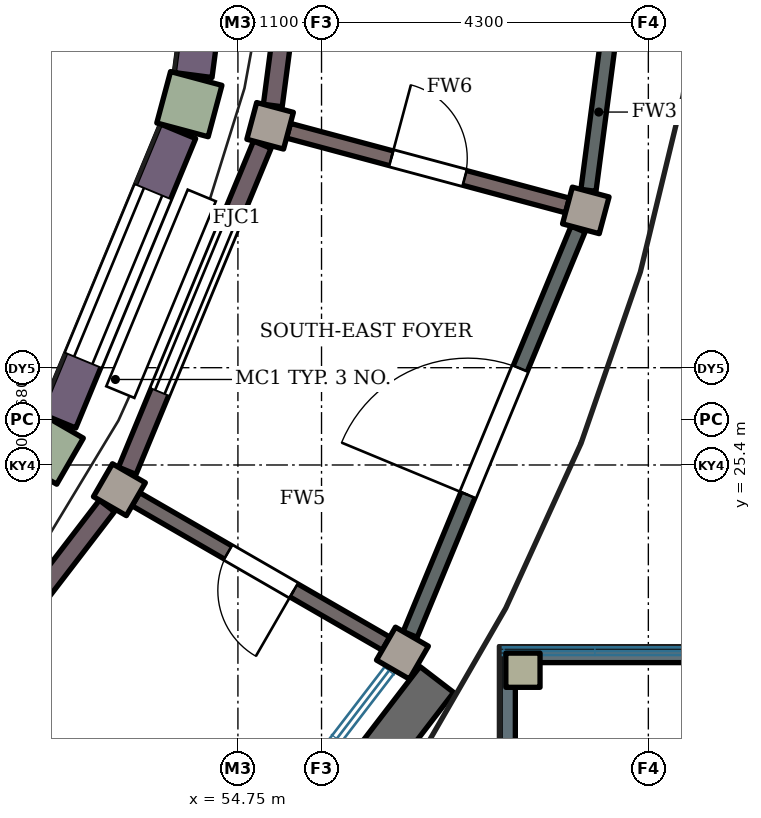
"""IFC4 building model, lengths in metres.
Left out: names, types, materials, properties, quantities, classifications, styles, units other than length and angle.
Written with IfcOpenShell. Run it as: python <this file> out.ifc"""

import sys

from ifc_helpers import new_model, si_unit, direction, frame, frame_2d, origin, origin_2d, place, context, subcontext, project, spatial, rectangle, extrude, element, fill, save


model = new_model("IFC4")
c1 = context("Model", 3, precision=1e-05, world=origin(), true_north=direction((0.0, 1.0)))
c2 = subcontext(c1, "Body", "Model", "MODEL_VIEW")
j1 = project(units=[si_unit("LENGTHUNIT", "METRE"), si_unit("PLANEANGLEUNIT", "RADIAN")], contexts=[c1])
p1 = place(None, origin())
s1 = spatial("IfcSite", under=j1, at=p1, CompositionType="ELEMENT")
p2 = place(p1, origin())
s2 = spatial("IfcBuilding", under=s1, at=p2, CompositionType="ELEMENT")
p3 = place(p2, origin())
s3 = spatial("IfcBuildingStorey", under=s2, at=p3, CompositionType="ELEMENT", Elevation=0.0)
for number, where, z_axis, x_axis in (
    (1, (52.238, 25.625, 0.0), (0.0, 0.0, 1.0), (0.5, 0.866, 0.0)),
    (2, (54.111, 30.147, 0.0), (0.0, 0.0, 1.0), (0.259, 0.966, 0.0)),
):
    element("IfcColumn", number, at=place(p3, frame(where, z_axis=z_axis, x_axis=x_axis)), inside=s3, PredefinedType="COLUMN", context=c2, shape_type="SweptSolid", body=[
        extrude(rectangle(XDim=0.7, YDim=0.7, at=origin_2d()), origin(), (0.0, 0.0, 1.0), 4.2),
    ])
p4 = place(p3, frame((52.386, 25.982, 0.0), z_axis=(0.0, 0.0, 1.0), x_axis=(0.382688328955, 0.923877504262, 0.0)))
e3 = element("IfcWall", 3, at=p4, inside=s3, PredefinedType="SHEAR", context=c2, shape_type="SweptSolid", body=[
    extrude(rectangle(XDim=4.122, YDim=0.5, at=frame_2d((2.061, 0.0))), origin(), (0.0, 0.0, 1.0), 3.4),
])
p5 = place(p4, frame((0.861, 0.0, 0.0)))
e4 = element("IfcOpeningElement", 4, at=p5, cuts=e3, PredefinedType="OPENING", context=c2, shape_type="SweptSolid", body=[
    extrude(rectangle(XDim=2.4, YDim=3.2, at=frame_2d((1.2, 1.6))), frame((0.0, 0.26, 0.0), z_axis=(0.0, -1.0, 0.0), x_axis=(1.0, 0.0, 0.0)), (0.0, 0.0, 1.0), 0.52),
])
p6 = place(p3, frame((54.162, 30.53, 0.0), z_axis=(0.0, 0.0, 1.0), x_axis=(0.130483623501, 0.991450464722, 0.0)))
e5 = element("IfcWall", 5, at=p6, inside=s3, PredefinedType="SHEAR", context=c2, shape_type="SweptSolid", body=[
    extrude(rectangle(XDim=4.122, YDim=0.5, at=frame_2d((2.061, 0.0))), origin(), (0.0, 0.0, 1.0), 3.4),
])
for number, where, z_axis, x_axis in (
    (6, (53.191, 25.075, 0.0), (0.0, 0.0, 1.0), (0.5, 0.866, 0.0)),
    (7, (55.174, 29.863, 0.0), (0.0, 0.0, 1.0), (0.259, 0.966, 0.0)),
    (8, (56.915, 22.925, 0.0), (0.0, 0.0, 1.0), (0.5, 0.866, 0.0)),
    (9, (59.327, 28.75, 0.0), (0.0, 0.0, 1.0), (0.259, 0.966, 0.0)),
):
    element("IfcColumn", number, at=place(p3, frame(where, z_axis=z_axis, x_axis=x_axis)), inside=s3, PredefinedType="COLUMN", context=c2, shape_type="SweptSolid", body=[
        extrude(rectangle(XDim=0.5, YDim=0.5, at=origin_2d()), origin(), (0.0, 0.0, 1.0), 4.2),
    ])
p7 = place(p3, frame((50.2, 21.177, 0.0), z_axis=(0.0, 0.0, 1.0), x_axis=(0.608762612058, 0.793352432504, 0.0)))
e10 = element("IfcWall", 10, at=p7, inside=s3, PredefinedType="SHEAR", context=c2, shape_type="SweptSolid", body=[
    extrude(rectangle(XDim=4.644, YDim=0.25, at=frame_2d((2.322, 0.0))), origin(), (0.0, 0.0, 1.0), 3.6),
])
p8 = place(p3, frame((53.294, 25.324, 0.0), z_axis=(0.0, 0.0, 1.0), x_axis=(0.382658268537, 0.923889955309, 0.0)))
e11 = element("IfcWall", 11, at=p8, inside=s3, PredefinedType="SHEAR", context=c2, shape_type="SweptSolid", body=[
    extrude(rectangle(XDim=4.644, YDim=0.25, at=frame_2d((2.322, 0.0))), origin(), (0.0, 0.0, 1.0), 3.6),
])
p9 = place(p8, frame((1.122, 0.0, 0.0)))
e12 = element("IfcOpeningElement", 12, at=p9, cuts=e11, PredefinedType="OPENING", context=c2, shape_type="SweptSolid", body=[
    extrude(rectangle(XDim=2.4, YDim=2.6, at=frame_2d((1.2, 1.3))), frame((0.0, 0.135, 0.0), z_axis=(0.0, -1.0, 0.0), x_axis=(1.0, 0.0, 0.0)), (0.0, 0.0, 1.0), 0.27),
])
p10 = place(p3, frame((55.209, 30.129, 0.0), z_axis=(0.0, 0.0, 1.0), x_axis=(0.130541551055, 0.991442839224, 0.0)))
e13 = element("IfcWall", 13, at=p10, inside=s3, PredefinedType="SHEAR", context=c2, shape_type="SweptSolid", body=[
    extrude(rectangle(XDim=4.644, YDim=0.25, at=frame_2d((2.322, 0.0))), origin(), (0.0, 0.0, 1.0), 3.6),
])
p11 = place(p3, frame((58.5, 22.7, 0.0), z_axis=(0.0, 0.0, 1.0), x_axis=(1.0, 0.0, 0.0)))
e14 = element("IfcColumn", 14, at=p11, inside=s3, PredefinedType="COLUMN", context=c2, shape_type="SweptSolid", body=[
    extrude(rectangle(XDim=0.45, YDim=0.45, at=origin_2d()), origin(), (0.0, 0.0, 1.0), 3.78),
])
p12 = place(p3, frame((58.3, 20.0, 4.0), z_axis=(0.0, 0.0, 1.0), x_axis=(0.0, 1.0, 0.0)))
e15 = element("IfcWall", 15, at=p12, inside=s3, PredefinedType="PARAPET", context=c2, shape_type="SweptSolid", body=[
    extrude(rectangle(XDim=3.0, YDim=0.2, at=frame_2d((1.5, 0.0))), origin(), (0.0, 0.0, 1.0), 0.45),
])
p13 = place(p3, frame((58.4, 22.9, 4.0), z_axis=(0.0, 0.0, 1.0), x_axis=(1.0, 0.0, 0.0)))
e16 = element("IfcWall", 16, at=p13, inside=s3, PredefinedType="PARAPET", context=c2, shape_type="SweptSolid", body=[
    extrude(rectangle(XDim=7.0, YDim=0.2, at=frame_2d((3.5, 0.0))), origin(), (0.0, 0.0, 1.0), 0.45),
])
p14 = place(p3, frame((57.016, 23.171, 0.0), z_axis=(0.0, 0.0, 1.0), x_axis=(0.382665553446, 0.923886938, 0.0)))
e17 = element("IfcWall", 17, at=p14, inside=s3, PredefinedType="STANDARD", context=c2, shape_type="SweptSolid", body=[
    extrude(rectangle(XDim=5.773, YDim=0.2, at=frame_2d((2.886, 0.0))), origin(), (0.0, 0.0, 1.0), 3.5),
])
p15 = place(p14, frame((1.986, 0.0, 0.0)))
e18 = element("IfcOpeningElement", 18, at=p15, cuts=e17, PredefinedType="OPENING", context=c2, shape_type="SweptSolid", body=[
    extrude(rectangle(XDim=1.8, YDim=2.4, at=frame_2d((0.9, 1.2))), frame((0.0, 0.11, 0.0), z_axis=(0.0, -1.0, 0.0), x_axis=(1.0, 0.0, 0.0)), (0.0, 0.0, 1.0), 0.22),
])
p16 = place(p3, frame((59.362, 29.013, 0.0), z_axis=(0.0, 0.0, 1.0), x_axis=(0.130512494435, 0.991446664625, 0.0)))
e19 = element("IfcWall", 19, at=p16, inside=s3, PredefinedType="STANDARD", context=c2, shape_type="SweptSolid", body=[
    extrude(rectangle(XDim=5.773, YDim=0.2, at=frame_2d((2.886, 0.0))), origin(), (0.0, 0.0, 1.0), 3.5),
])
p17 = place(p16, frame((1.986, 0.0, 0.0)))
e20 = element("IfcOpeningElement", 20, at=p17, cuts=e19, PredefinedType="OPENING", context=c2, shape_type="SweptSolid", body=[
    extrude(rectangle(XDim=1.8, YDim=2.4, at=frame_2d((0.9, 1.2))), frame((0.0, 0.11, 0.0), z_axis=(0.0, -1.0, 0.0), x_axis=(1.0, 0.0, 0.0)), (0.0, 0.0, 1.0), 0.22),
])
p18 = place(p3, frame((53.492, 17.529, 0.0), z_axis=(0.0, 0.0, 1.0), x_axis=(0.60874074273, 0.793369213003, 0.0)))
e21 = element("IfcWall", 21, at=p18, inside=s3, PredefinedType="STANDARD", context=c2, shape_type="SweptSolid", body=[
    extrude(rectangle(XDim=6.365, YDim=0.56, at=frame_2d((3.182, 0.0))), origin(), (0.0, 0.0, 1.0), 0.3),
])
p19 = place(p3, frame((53.407, 24.95, 0.0), z_axis=(0.0, 0.0, 1.0), x_axis=(0.866028304915, -0.499994975061, 0.0)))
e22 = element("IfcWall", 22, at=p19, inside=s3, PredefinedType="PARTITIONING", context=c2, shape_type="SweptSolid", body=[
    extrude(rectangle(XDim=3.8, YDim=0.2, at=frame_2d((1.9, 0.0))), origin(), (0.0, 0.0, 1.0), 4.0),
])
p20 = place(p19, frame((1.4, 0.0, 0.0)))
e23 = element("IfcOpeningElement", 23, at=p20, cuts=e22, PredefinedType="OPENING", context=c2, shape_type="SweptSolid", body=[
    extrude(rectangle(XDim=1.0, YDim=2.1, at=frame_2d((0.5, 1.05))), frame((0.0, 0.11, 0.0), z_axis=(0.0, -1.0, 0.0), x_axis=(1.0, 0.0, 0.0)), (0.0, 0.0, 1.0), 0.22),
])
p21 = place(p3, frame((55.415, 29.798, 0.0), z_axis=(0.0, 0.0, 1.0), x_axis=(0.965919660258, -0.258842055948, 0.0)))
e24 = element("IfcWall", 24, at=p21, inside=s3, PredefinedType="STANDARD", context=c2, shape_type="SweptSolid", body=[
    extrude(rectangle(XDim=3.8, YDim=0.2, at=frame_2d((1.9, 0.0))), origin(), (0.0, 0.0, 1.0), 4.0),
])
p22 = place(p21, frame((1.4, 0.0, 0.0)))
e25 = element("IfcOpeningElement", 25, at=p22, cuts=e24, PredefinedType="OPENING", context=c2, shape_type="SweptSolid", body=[
    extrude(rectangle(XDim=1.0, YDim=2.1, at=frame_2d((0.5, 1.05))), frame((0.0, 0.11, 0.0), z_axis=(0.0, -1.0, 0.0), x_axis=(1.0, 0.0, 0.0)), (0.0, 0.0, 1.0), 0.22),
])
p23 = place(p5, origin())
e26 = element("IfcDoor", 26, at=p23, inside=s3, OperationType="DOUBLE_DOOR_SLIDING", PredefinedType="DOOR", context=c2, shape_type="SweptSolid", body=[
    extrude(rectangle(XDim=2.4, YDim=3.2, at=frame_2d((1.2, 1.6))), frame((0.0, 0.025, 0.0), z_axis=(0.0, -1.0, 0.0), x_axis=(1.0, 0.0, 0.0)), (0.0, 0.0, 1.0), 0.05),
])
fill(e4, e26)
p24 = place(p15, origin())
e27 = element("IfcDoor", 27, at=p24, inside=s3, OperationType="DOUBLE_DOOR_DOUBLE_SWING", PredefinedType="DOOR", context=c2, shape_type="SweptSolid", body=[
    extrude(rectangle(XDim=1.8, YDim=2.4, at=frame_2d((0.9, 1.2))), frame((0.0, 0.025, 0.0), z_axis=(0.0, -1.0, 0.0), x_axis=(1.0, 0.0, 0.0)), (0.0, 0.0, 1.0), 0.05),
])
fill(e18, e27)
p25 = place(p9, origin())
e28 = element("IfcDoor", 28, at=p25, inside=s3, OperationType="DOUBLE_DOOR_SLIDING", PredefinedType="DOOR", context=c2, shape_type="SweptSolid", body=[
    extrude(rectangle(XDim=2.4, YDim=2.6, at=frame_2d((1.2, 1.3))), frame((0.0, 0.025, 0.0), z_axis=(0.0, -1.0, 0.0), x_axis=(1.0, 0.0, 0.0)), (0.0, 0.0, 1.0), 0.05),
])
fill(e12, e28)
p26 = place(p20, origin())
e29 = element("IfcDoor", 29, at=p26, inside=s3, OperationType="SINGLE_SWING_RIGHT", PredefinedType="DOOR", context=c2, shape_type="SweptSolid", body=[
    extrude(rectangle(XDim=1.0, YDim=2.1, at=frame_2d((0.5, 1.05))), frame((0.0, 0.025, 0.0), z_axis=(0.0, -1.0, 0.0), x_axis=(1.0, 0.0, 0.0)), (0.0, 0.0, 1.0), 0.05),
])
fill(e23, e29)
p27 = place(p22, origin())
e30 = element("IfcDoor", 30, at=p27, inside=s3, OperationType="SINGLE_SWING_LEFT", PredefinedType="DOOR", context=c2, shape_type="SweptSolid", body=[
    extrude(rectangle(XDim=1.0, YDim=2.1, at=frame_2d((0.5, 1.05))), frame((0.0, 0.025, 0.0), z_axis=(0.0, -1.0, 0.0), x_axis=(1.0, 0.0, 0.0)), (0.0, 0.0, 1.0), 0.05),
])
fill(e25, e30)
save(model, sys.argv[1])
